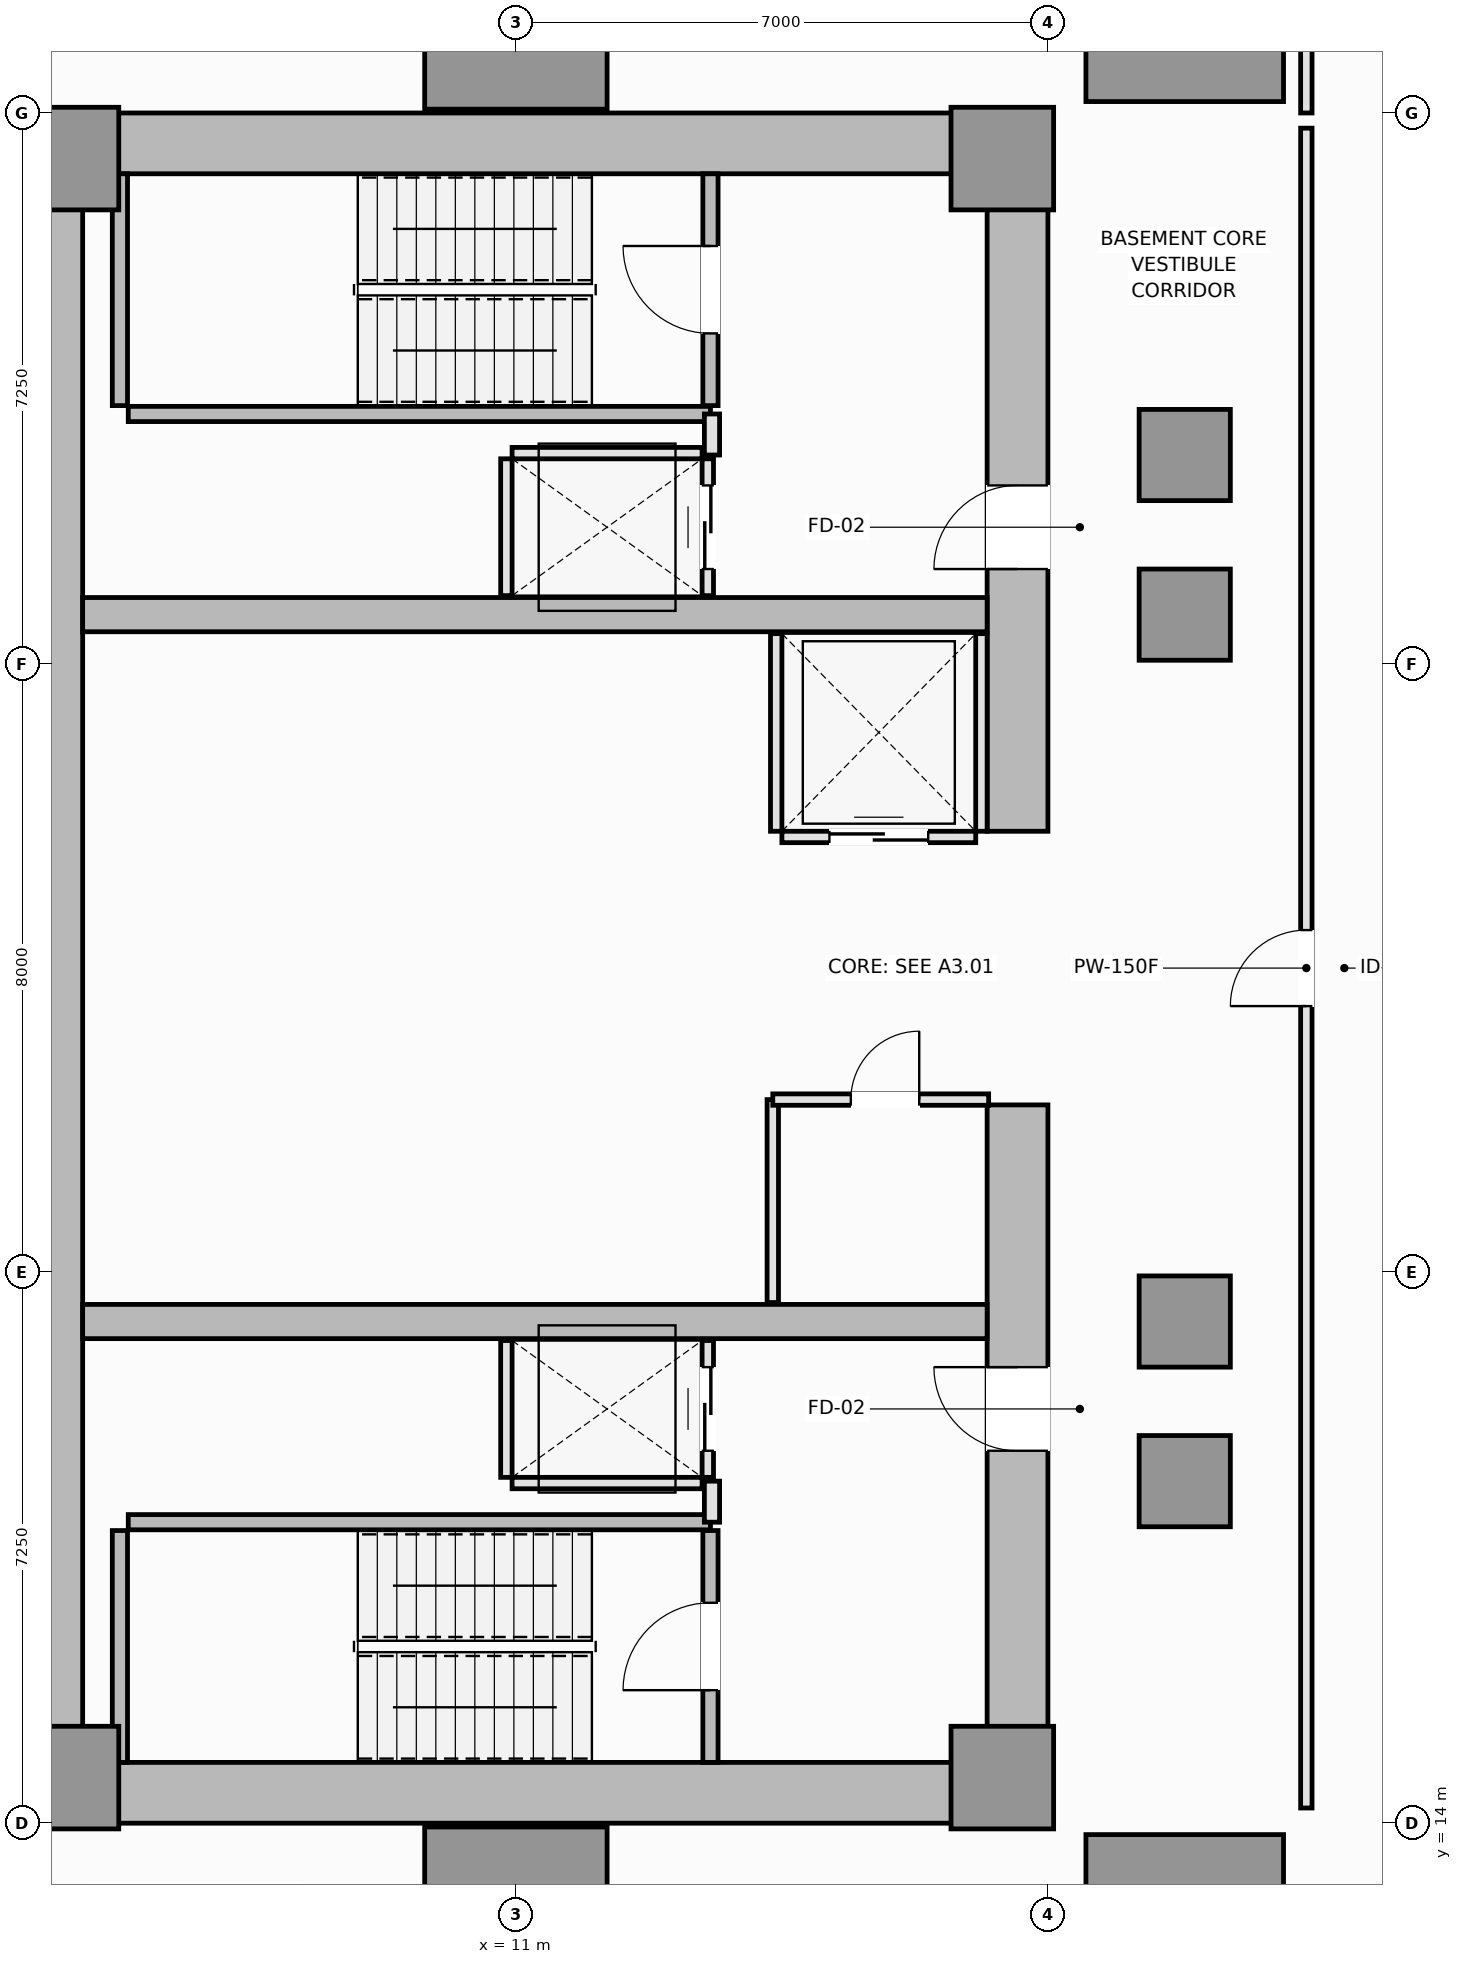
"""IFC4 building model, lengths in metres.
Left out: names, types, materials, properties, quantities, classifications, styles, units other than length and angle.
Written with IfcOpenShell. Run it as: python <this file> out.ifc"""

import sys

from ifc_helpers import new_model, si_unit, direction, frame, frame_2d, origin, origin_2d, place, context, subcontext, project, spatial, rectangle, extrude, element, fill, save


model = new_model("IFC4")
c1 = context("Model", 3, precision=1e-05, world=origin(), true_north=direction((0.0, 1.0)))
c2 = subcontext(c1, "Body", "Model", "MODEL_VIEW")
j1 = project(units=[si_unit("LENGTHUNIT", "METRE"), si_unit("PLANEANGLEUNIT", "RADIAN")], contexts=[c1])
p1 = place(None, origin())
s1 = spatial("IfcSite", under=j1, at=p1, CompositionType="ELEMENT")
p2 = place(p1, origin())
s2 = spatial("IfcBuilding", under=s1, at=p2, CompositionType="ELEMENT")
p3 = place(p2, frame((0.0, 0.0, -13.2)))
s3 = spatial("IfcBuildingStorey", under=s2, at=p3, CompositionType="ELEMENT", Elevation=-13.2)
for number, where, z_axis, x_axis in (
    (1, (4.5, 14.4, 0.0), (0.0, 0.0, 1.0), (1.0, 0.0, 0.0)),
    (2, (4.5, 36.1, 0.0), (0.0, 0.0, 1.0), (1.0, 0.0, 0.0)),
):
    element("IfcWall", number, at=place(p3, frame(where, z_axis=z_axis, x_axis=x_axis)), inside=s3, PredefinedType="SHEAR", context=c2, shape_type="SweptSolid", body=[
        extrude(rectangle(XDim=13.5, YDim=0.8, at=frame_2d((6.75, 0.0))), origin(), (0.0, 0.0, 1.0), 4.2),
    ])
p4 = place(p3, frame((4.9, 14.8, 0.0), z_axis=(0.0, 0.0, 1.0), x_axis=(0.0, 1.0, 0.0)))
e3 = element("IfcWall", 3, at=p4, inside=s3, PredefinedType="SHEAR", context=c2, shape_type="SweptSolid", body=[
    extrude(rectangle(XDim=20.9, YDim=0.8, at=frame_2d((10.45, 0.0))), origin(), (0.0, 0.0, 1.0), 4.2),
])
p5 = place(p3, frame((17.6, 14.8, 0.0), z_axis=(0.0, 0.0, 1.0), x_axis=(0.0, 1.0, 0.0)))
e4 = element("IfcWall", 4, at=p5, inside=s3, PredefinedType="SHEAR", context=c2, shape_type="SweptSolid", body=[
    extrude(rectangle(XDim=8.65, YDim=0.8, at=frame_2d((4.325, 0.0))), origin(), (0.0, 0.0, 1.0), 4.2),
])
p6 = place(p5, frame((4.1, 0.0, 0.0)))
e5 = element("IfcOpeningElement", 5, at=p6, cuts=e4, PredefinedType="OPENING", context=c2, shape_type="SweptSolid", body=[
    extrude(rectangle(XDim=1.1, YDim=2.15, at=frame_2d((0.55, 1.075))), frame((0.0, 0.41, 0.0), z_axis=(0.0, -1.0, 0.0), x_axis=(1.0, 0.0, 0.0)), (0.0, 0.0, 1.0), 0.82),
])
p7 = place(p3, frame((17.6, 27.05, 0.0), z_axis=(0.0, 0.0, 1.0), x_axis=(0.0, 1.0, 0.0)))
e6 = element("IfcWall", 6, at=p7, inside=s3, PredefinedType="SHEAR", context=c2, shape_type="SweptSolid", body=[
    extrude(rectangle(XDim=8.65, YDim=0.8, at=frame_2d((4.325, 0.0))), origin(), (0.0, 0.0, 1.0), 4.2),
])
p8 = place(p7, frame((3.45, 0.0, 0.0)))
e7 = element("IfcOpeningElement", 7, at=p8, cuts=e6, PredefinedType="OPENING", context=c2, shape_type="SweptSolid", body=[
    extrude(rectangle(XDim=1.1, YDim=2.15, at=frame_2d((0.55, 1.075))), frame((0.0, 0.41, 0.0), z_axis=(0.0, -1.0, 0.0), x_axis=(1.0, 0.0, 0.0)), (0.0, 0.0, 1.0), 0.82),
])
for number, where, z_axis, x_axis in (
    (8, (5.3, 20.6, 0.0), (0.0, 0.0, 1.0), (1.0, 0.0, 0.0)),
    (9, (5.3, 29.9, 0.0), (0.0, 0.0, 1.0), (1.0, 0.0, 0.0)),
):
    element("IfcWall", number, at=place(p3, frame(where, z_axis=z_axis, x_axis=x_axis)), inside=s3, PredefinedType="SHEAR", context=c2, shape_type="SweptSolid", body=[
        extrude(rectangle(XDim=11.9, YDim=0.45, at=frame_2d((5.95, 0.0))), origin(), (0.0, 0.0, 1.0), 4.2),
    ])
for number, where, z_axis, x_axis in (
    (10, (5.1, 14.6, 0.0), (0.0, 0.0, 1.0), (1.0, 0.0, 0.0)),
    (11, (5.1, 35.9, 0.0), (0.0, 0.0, 1.0), (1.0, 0.0, 0.0)),
    (12, (17.4, 14.6, 0.0), (0.0, 0.0, 1.0), (1.0, 0.0, 0.0)),
    (13, (17.4, 35.9, 0.0), (0.0, 0.0, 1.0), (1.0, 0.0, 0.0)),
):
    element("IfcColumn", number, at=place(p3, frame(where, z_axis=z_axis, x_axis=x_axis)), inside=s3, PredefinedType="PILASTER", context=c2, shape_type="SweptSolid", body=[
        extrude(rectangle(XDim=1.35, YDim=1.35, at=origin_2d()), origin(), (0.0, 0.0, 1.0), 4.2),
    ])
for number, where, z_axis, x_axis in (
    (14, (11.0, 12.75, 0.0), (0.0, 0.0, 1.0), (1.0, 0.0, 0.0)),
    (15, (11.0, 37.75, 0.0), (0.0, 0.0, 1.0), (1.0, 0.0, 0.0)),
):
    element("IfcColumn", number, at=place(p3, frame(where, z_axis=z_axis, x_axis=x_axis)), inside=s3, PredefinedType="COLUMN", context=c2, shape_type="SweptSolid", body=[
        extrude(rectangle(XDim=2.4, YDim=2.4, at=origin_2d()), origin(), (0.0, 0.0, 1.0), 4.2),
    ])
for number, where, z_axis, x_axis in (
    (16, (19.8, 12.75, 0.0), (0.0, 0.0, 1.0), (1.0, 0.0, 0.0)),
    (17, (19.8, 37.75, 0.0), (0.0, 0.0, 1.0), (1.0, 0.0, 0.0)),
):
    element("IfcColumn", number, at=place(p3, frame(where, z_axis=z_axis, x_axis=x_axis)), inside=s3, PredefinedType="COLUMN", context=c2, shape_type="SweptSolid", body=[
        extrude(rectangle(XDim=2.6, YDim=2.2, at=origin_2d()), origin(), (0.0, 0.0, 1.0), 4.2),
    ])
for number, where, z_axis, x_axis in (
    (18, (19.8, 18.5, 0.0), (0.0, 0.0, 1.0), (1.0, 0.0, 0.0)),
    (19, (19.8, 20.6, 0.0), (0.0, 0.0, 1.0), (1.0, 0.0, 0.0)),
    (20, (19.8, 29.9, 0.0), (0.0, 0.0, 1.0), (1.0, 0.0, 0.0)),
    (21, (19.8, 32.0, 0.0), (0.0, 0.0, 1.0), (1.0, 0.0, 0.0)),
):
    element("IfcColumn", number, at=place(p3, frame(where, z_axis=z_axis, x_axis=x_axis)), inside=s3, PredefinedType="COLUMN", context=c2, shape_type="SweptSolid", body=[
        extrude(rectangle(XDim=1.2, YDim=1.2, at=origin_2d()), origin(), (0.0, 0.0, 1.0), 4.2),
    ])
p9 = place(p3, frame((5.79, 14.8, 0.0), z_axis=(0.0, 0.0, 1.0), x_axis=(0.0, 1.0, 0.0)))
e22 = element("IfcWall", 22, at=p9, inside=s3, PredefinedType="SOLIDWALL", context=c2, shape_type="SweptSolid", body=[
    extrude(rectangle(XDim=3.05, YDim=0.2, at=frame_2d((1.525, 0.0))), origin(), (0.0, 0.0, 1.0), 4.2),
])
p10 = place(p3, frame((5.9, 17.96, 0.0), z_axis=(0.0, 0.0, 1.0), x_axis=(1.0, 0.0, 0.0)))
e23 = element("IfcWall", 23, at=p10, inside=s3, PredefinedType="SOLIDWALL", context=c2, shape_type="SweptSolid", body=[
    extrude(rectangle(XDim=7.66, YDim=0.2, at=frame_2d((3.83, 0.0))), origin(), (0.0, 0.0, 1.0), 4.2),
])
p11 = place(p3, frame((13.56, 14.8, 0.0), z_axis=(0.0, 0.0, 1.0), x_axis=(0.0, 1.0, 0.0)))
e24 = element("IfcWall", 24, at=p11, inside=s3, PredefinedType="SOLIDWALL", context=c2, shape_type="SweptSolid", body=[
    extrude(rectangle(XDim=3.05, YDim=0.2, at=frame_2d((1.525, 0.0))), origin(), (0.0, 0.0, 1.0), 4.2),
])
p12 = place(p11, frame((0.95, 0.0, 0.0)))
e25 = element("IfcOpeningElement", 25, at=p12, cuts=e24, PredefinedType="OPENING", context=c2, shape_type="SweptSolid", body=[
    extrude(rectangle(XDim=1.15, YDim=2.15, at=frame_2d((0.575, 1.075))), frame((0.0, 0.11, 0.0), z_axis=(0.0, -1.0, 0.0), x_axis=(1.0, 0.0, 0.0)), (0.0, 0.0, 1.0), 0.22),
])
p13 = place(p3, frame((5.79, 32.65, 0.0), z_axis=(0.0, 0.0, 1.0), x_axis=(0.0, 1.0, 0.0)))
e26 = element("IfcWall", 26, at=p13, inside=s3, PredefinedType="SOLIDWALL", context=c2, shape_type="SweptSolid", body=[
    extrude(rectangle(XDim=3.05, YDim=0.2, at=frame_2d((1.525, 0.0))), origin(), (0.0, 0.0, 1.0), 4.2),
])
p14 = place(p3, frame((5.9, 32.54, 0.0), z_axis=(0.0, 0.0, 1.0), x_axis=(1.0, 0.0, 0.0)))
e27 = element("IfcWall", 27, at=p14, inside=s3, PredefinedType="SOLIDWALL", context=c2, shape_type="SweptSolid", body=[
    extrude(rectangle(XDim=7.66, YDim=0.2, at=frame_2d((3.83, 0.0))), origin(), (0.0, 0.0, 1.0), 4.2),
])
p15 = place(p3, frame((13.56, 32.65, 0.0), z_axis=(0.0, 0.0, 1.0), x_axis=(0.0, 1.0, 0.0)))
e28 = element("IfcWall", 28, at=p15, inside=s3, PredefinedType="SOLIDWALL", context=c2, shape_type="SweptSolid", body=[
    extrude(rectangle(XDim=3.05, YDim=0.2, at=frame_2d((1.525, 0.0))), origin(), (0.0, 0.0, 1.0), 4.2),
])
p16 = place(p15, frame((0.95, 0.0, 0.0)))
e29 = element("IfcOpeningElement", 29, at=p16, cuts=e28, PredefinedType="OPENING", context=c2, shape_type="SweptSolid", body=[
    extrude(rectangle(XDim=1.15, YDim=2.15, at=frame_2d((0.575, 1.075))), frame((0.0, 0.11, 0.0), z_axis=(0.0, -1.0, 0.0), x_axis=(1.0, 0.0, 0.0)), (0.0, 0.0, 1.0), 0.22),
])
p17 = place(p3, frame((14.5, 26.975, 0.0), z_axis=(0.0, 0.0, 1.0), x_axis=(1.0, 0.0, 0.0)))
e30 = element("IfcWall", 30, at=p17, inside=s3, PredefinedType="PARTITIONING", context=c2, shape_type="SweptSolid", body=[
    extrude(rectangle(XDim=2.55, YDim=0.15, at=frame_2d((1.275, 0.0))), origin(), (0.0, 0.0, 1.0), 4.0),
])
p18 = place(p17, frame((0.625, 0.0, 0.0)))
e31 = element("IfcOpeningElement", 31, at=p18, cuts=e30, PredefinedType="OPENING", context=c2, shape_type="SweptSolid", body=[
    extrude(rectangle(XDim=1.3, YDim=2.2, at=frame_2d((0.65, 1.1))), frame((0.0, 0.085, 0.0), z_axis=(0.0, -1.0, 0.0), x_axis=(1.0, 0.0, 0.0)), (0.0, 0.0, 1.0), 0.17),
])
for number, where, z_axis, x_axis in (
    (32, (14.425, 27.05, 0.0), (0.0, 0.0, 1.0), (0.0, 1.0, 0.0)),
    (33, (17.125, 27.05, 0.0), (0.0, 0.0, 1.0), (0.0, 1.0, 0.0)),
):
    element("IfcWall", number, at=place(p3, frame(where, z_axis=z_axis, x_axis=x_axis)), inside=s3, PredefinedType="PARTITIONING", context=c2, shape_type="SweptSolid", body=[
        extrude(rectangle(XDim=2.6, YDim=0.15, at=frame_2d((1.3, 0.0))), origin(), (0.0, 0.0, 1.0), 4.0),
    ])
p19 = place(p3, frame((10.95, 18.475, 0.0), z_axis=(0.0, 0.0, 1.0), x_axis=(1.0, 0.0, 0.0)))
e34 = element("IfcWall", 34, at=p19, inside=s3, PredefinedType="PARTITIONING", context=c2, shape_type="SweptSolid", body=[
    extrude(rectangle(XDim=2.5, YDim=0.15, at=frame_2d((1.25, 0.0))), origin(), (0.0, 0.0, 1.0), 4.0),
])
p20 = place(p3, frame((10.875, 18.55, 0.0), z_axis=(0.0, 0.0, 1.0), x_axis=(0.0, 1.0, 0.0)))
e35 = element("IfcWall", 35, at=p20, inside=s3, PredefinedType="PARTITIONING", context=c2, shape_type="SweptSolid", body=[
    extrude(rectangle(XDim=1.8, YDim=0.15, at=frame_2d((0.9, 0.0))), origin(), (0.0, 0.0, 1.0), 4.0),
])
p21 = place(p3, frame((13.525, 18.55, 0.0), z_axis=(0.0, 0.0, 1.0), x_axis=(0.0, 1.0, 0.0)))
e36 = element("IfcWall", 36, at=p21, inside=s3, PredefinedType="PARTITIONING", context=c2, shape_type="SweptSolid", body=[
    extrude(rectangle(XDim=1.8, YDim=0.15, at=frame_2d((0.9, 0.0))), origin(), (0.0, 0.0, 1.0), 4.0),
])
p22 = place(p21, frame((0.35, 0.0, 0.0)))
e37 = element("IfcOpeningElement", 37, at=p22, cuts=e36, PredefinedType="OPENING", context=c2, shape_type="SweptSolid", body=[
    extrude(rectangle(XDim=1.1, YDim=2.2, at=frame_2d((0.55, 1.1))), frame((0.0, 0.085, 0.0), z_axis=(0.0, -1.0, 0.0), x_axis=(1.0, 0.0, 0.0)), (0.0, 0.0, 1.0), 0.17),
])
p23 = place(p3, frame((10.95, 32.025, 0.0), z_axis=(0.0, 0.0, 1.0), x_axis=(1.0, 0.0, 0.0)))
e38 = element("IfcWall", 38, at=p23, inside=s3, PredefinedType="PARTITIONING", context=c2, shape_type="SweptSolid", body=[
    extrude(rectangle(XDim=2.5, YDim=0.15, at=frame_2d((1.25, 0.0))), origin(), (0.0, 0.0, 1.0), 4.0),
])
p24 = place(p3, frame((10.875, 30.15, 0.0), z_axis=(0.0, 0.0, 1.0), x_axis=(0.0, 1.0, 0.0)))
e39 = element("IfcWall", 39, at=p24, inside=s3, PredefinedType="PARTITIONING", context=c2, shape_type="SweptSolid", body=[
    extrude(rectangle(XDim=1.8, YDim=0.15, at=frame_2d((0.9, 0.0))), origin(), (0.0, 0.0, 1.0), 4.0),
])
p25 = place(p3, frame((13.525, 30.15, 0.0), z_axis=(0.0, 0.0, 1.0), x_axis=(0.0, 1.0, 0.0)))
e40 = element("IfcWall", 40, at=p25, inside=s3, PredefinedType="PARTITIONING", context=c2, shape_type="SweptSolid", body=[
    extrude(rectangle(XDim=1.8, YDim=0.15, at=frame_2d((0.9, 0.0))), origin(), (0.0, 0.0, 1.0), 4.0),
])
p26 = place(p25, frame((0.35, 0.0, 0.0)))
e41 = element("IfcOpeningElement", 41, at=p26, cuts=e40, PredefinedType="OPENING", context=c2, shape_type="SweptSolid", body=[
    extrude(rectangle(XDim=1.1, YDim=2.2, at=frame_2d((0.55, 1.1))), frame((0.0, 0.085, 0.0), z_axis=(0.0, -1.0, 0.0), x_axis=(1.0, 0.0, 0.0)), (0.0, 0.0, 1.0), 0.17),
])
for number, where, z_axis, x_axis in (
    (42, (13.58, 17.96, 0.0), (0.0, 0.0, 1.0), (0.0, 1.0, 0.0)),
    (43, (13.58, 32.0, 0.0), (0.0, 0.0, 1.0), (0.0, 1.0, 0.0)),
):
    element("IfcWall", number, at=place(p3, frame(where, z_axis=z_axis, x_axis=x_axis)), inside=s3, PredefinedType="PARTITIONING", context=c2, shape_type="SweptSolid", body=[
        extrude(rectangle(XDim=0.54, YDim=0.2, at=frame_2d((0.27, 0.0))), origin(), (0.0, 0.0, 1.0), 4.0),
    ])
p27 = place(p3, frame((14.38, 20.85, 0.0), z_axis=(0.0, 0.0, 1.0), x_axis=(0.0, 1.0, 0.0)))
e44 = element("IfcWall", 44, at=p27, inside=s3, PredefinedType="PARTITIONING", context=c2, shape_type="SweptSolid", body=[
    extrude(rectangle(XDim=2.67, YDim=0.15, at=frame_2d((1.335, 0.0))), origin(), (0.0, 0.0, 1.0), 4.0),
])
p28 = place(p3, frame((14.38, 23.52, 0.0), z_axis=(0.0, 0.0, 1.0), x_axis=(1.0, 0.0, 0.0)))
e45 = element("IfcWall", 45, at=p28, inside=s3, PredefinedType="PARTITIONING", context=c2, shape_type="SweptSolid", body=[
    extrude(rectangle(XDim=2.84, YDim=0.15, at=frame_2d((1.42, 0.0))), origin(), (0.0, 0.0, 1.0), 4.0),
])
p29 = place(p28, frame((1.027, 0.0, 0.0)))
e46 = element("IfcOpeningElement", 46, at=p29, cuts=e45, PredefinedType="OPENING", context=c2, shape_type="SweptSolid", body=[
    extrude(rectangle(XDim=0.9, YDim=2.1, at=frame_2d((0.45, 1.05))), frame((0.0, 0.085, 0.0), z_axis=(0.0, -1.0, 0.0), x_axis=(1.0, 0.0, 0.0)), (0.0, 0.0, 1.0), 0.17),
])
p30 = place(p3, frame((21.4, 14.2, 0.0), z_axis=(0.0, 0.0, 1.0), x_axis=(0.0, 1.0, 0.0)))
e47 = element("IfcWall", 47, at=p30, inside=s3, PredefinedType="PARTITIONING", context=c2, shape_type="SweptSolid", body=[
    extrude(rectangle(XDim=22.1, YDim=0.15, at=frame_2d((11.05, 0.0))), origin(), (0.0, 0.0, 1.0), 4.0),
])
p31 = place(p30, frame((10.55, 0.0, 0.0)))
e48 = element("IfcOpeningElement", 48, at=p31, cuts=e47, PredefinedType="OPENING", context=c2, shape_type="SweptSolid", body=[
    extrude(rectangle(XDim=1.0, YDim=2.15, at=frame_2d((0.5, 1.075))), frame((0.0, 0.085, 0.0), z_axis=(0.0, -1.0, 0.0), x_axis=(1.0, 0.0, 0.0)), (0.0, 0.0, 1.0), 0.17),
])
p32 = place(p3, frame((21.4, 36.5, 0.0), z_axis=(0.0, 0.0, 1.0), x_axis=(0.0, 1.0, 0.0)))
e49 = element("IfcWall", 49, at=p32, inside=s3, PredefinedType="PARTITIONING", context=c2, shape_type="SweptSolid", body=[
    extrude(rectangle(XDim=13.4, YDim=0.15, at=frame_2d((6.7, 0.0))), origin(), (0.0, 0.0, 1.0), 4.0),
])
p33 = place(p32, frame((6.2, 0.0, 0.0)))
e50 = element("IfcOpeningElement", 50, at=p33, cuts=e49, PredefinedType="OPENING", context=c2, shape_type="SweptSolid", body=[
    extrude(rectangle(XDim=1.0, YDim=2.15, at=frame_2d((0.5, 1.075))), frame((0.0, 0.085, 0.0), z_axis=(0.0, -1.0, 0.0), x_axis=(1.0, 0.0, 0.0)), (0.0, 0.0, 1.0), 0.17),
])
p34 = place(p12, origin())
e51 = element("IfcDoor", 51, at=p34, inside=s3, OperationType="SINGLE_SWING_LEFT", PredefinedType="DOOR", context=c2, shape_type="SweptSolid", body=[
    extrude(rectangle(XDim=1.15, YDim=2.15, at=frame_2d((0.575, 1.075))), frame((0.0, 0.025, 0.0), z_axis=(0.0, -1.0, 0.0), x_axis=(1.0, 0.0, 0.0)), (0.0, 0.0, 1.0), 0.05),
])
fill(e25, e51)
p35 = place(p16, origin())
e52 = element("IfcDoor", 52, at=p35, inside=s3, OperationType="SINGLE_SWING_RIGHT", PredefinedType="DOOR", context=c2, shape_type="SweptSolid", body=[
    extrude(rectangle(XDim=1.15, YDim=2.15, at=frame_2d((0.575, 1.075))), frame((0.0, 0.025, 0.0), z_axis=(0.0, -1.0, 0.0), x_axis=(1.0, 0.0, 0.0)), (0.0, 0.0, 1.0), 0.05),
])
fill(e29, e52)
p36 = place(p18, origin())
e53 = element("IfcDoor", 53, at=p36, inside=s3, OperationType="DOUBLE_DOOR_SLIDING", PredefinedType="DOOR", context=c2, shape_type="SweptSolid", body=[
    extrude(rectangle(XDim=1.3, YDim=2.2, at=frame_2d((0.65, 1.1))), frame((0.0, 0.025, 0.0), z_axis=(0.0, -1.0, 0.0), x_axis=(1.0, 0.0, 0.0)), (0.0, 0.0, 1.0), 0.05),
])
fill(e31, e53)
p37 = place(p22, origin())
e54 = element("IfcDoor", 54, at=p37, inside=s3, OperationType="DOUBLE_DOOR_SLIDING", PredefinedType="DOOR", context=c2, shape_type="SweptSolid", body=[
    extrude(rectangle(XDim=1.1, YDim=2.2, at=frame_2d((0.55, 1.1))), frame((0.0, 0.025, 0.0), z_axis=(0.0, -1.0, 0.0), x_axis=(1.0, 0.0, 0.0)), (0.0, 0.0, 1.0), 0.05),
])
fill(e37, e54)
p38 = place(p26, origin())
e55 = element("IfcDoor", 55, at=p38, inside=s3, OperationType="DOUBLE_DOOR_SLIDING", PredefinedType="DOOR", context=c2, shape_type="SweptSolid", body=[
    extrude(rectangle(XDim=1.1, YDim=2.2, at=frame_2d((0.55, 1.1))), frame((0.0, 0.025, 0.0), z_axis=(0.0, -1.0, 0.0), x_axis=(1.0, 0.0, 0.0)), (0.0, 0.0, 1.0), 0.05),
])
fill(e41, e55)
p39 = place(p6, origin())
e56 = element("IfcDoor", 56, at=p39, inside=s3, OperationType="SINGLE_SWING_RIGHT", PredefinedType="DOOR", context=c2, shape_type="SweptSolid", body=[
    extrude(rectangle(XDim=1.1, YDim=2.15, at=frame_2d((0.55, 1.075))), frame((0.0, 0.025, 0.0), z_axis=(0.0, -1.0, 0.0), x_axis=(1.0, 0.0, 0.0)), (0.0, 0.0, 1.0), 0.05),
])
fill(e5, e56)
p40 = place(p8, origin())
e57 = element("IfcDoor", 57, at=p40, inside=s3, OperationType="SINGLE_SWING_LEFT", PredefinedType="DOOR", context=c2, shape_type="SweptSolid", body=[
    extrude(rectangle(XDim=1.1, YDim=2.15, at=frame_2d((0.55, 1.075))), frame((0.0, 0.025, 0.0), z_axis=(0.0, -1.0, 0.0), x_axis=(1.0, 0.0, 0.0)), (0.0, 0.0, 1.0), 0.05),
])
fill(e7, e57)
p41 = place(p29, origin())
e58 = element("IfcDoor", 58, at=p41, inside=s3, OperationType="SINGLE_SWING_RIGHT", PredefinedType="DOOR", context=c2, shape_type="SweptSolid", body=[
    extrude(rectangle(XDim=0.9, YDim=2.1, at=frame_2d((0.45, 1.05))), frame((0.0, 0.025, 0.0), z_axis=(0.0, -1.0, 0.0), x_axis=(1.0, 0.0, 0.0)), (0.0, 0.0, 1.0), 0.05),
])
fill(e46, e58)
p42 = place(p31, origin())
e59 = element("IfcDoor", 59, at=p42, inside=s3, OperationType="SINGLE_SWING_LEFT", PredefinedType="DOOR", context=c2, shape_type="SweptSolid", body=[
    extrude(rectangle(XDim=1.0, YDim=2.15, at=frame_2d((0.5, 1.075))), frame((0.0, 0.025, 0.0), z_axis=(0.0, -1.0, 0.0), x_axis=(1.0, 0.0, 0.0)), (0.0, 0.0, 1.0), 0.05),
])
fill(e48, e59)
save(model, sys.argv[1])
